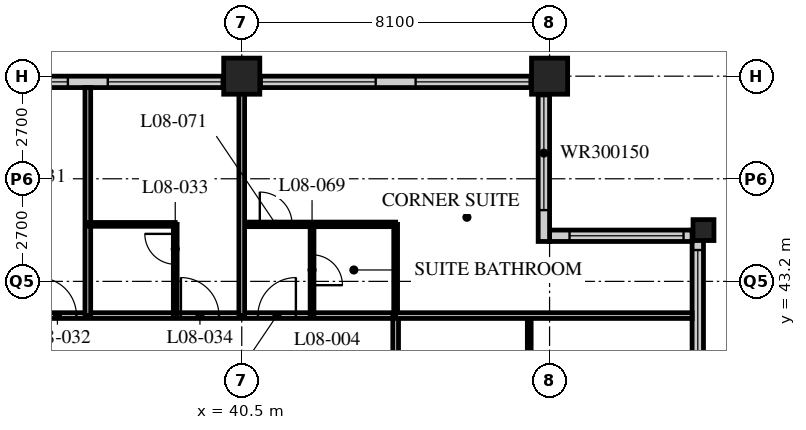
"""IFC4 building model, lengths in metres.
Left out: names, types, materials, properties, quantities, classifications, styles, units other than length and angle.
Written with IfcOpenShell. Run it as: python <this file> out.ifc"""

import sys

from ifc_helpers import new_model, si_unit, direction, frame, frame_2d, origin, origin_2d, place, context, subcontext, project, spatial, rectangle, hollow_rectangle, extrude, element, fill, save


model = new_model("IFC4")
c1 = context("Model", 3, precision=1e-05, world=origin(), true_north=direction((0.0, 1.0)))
c2 = subcontext(c1, "Body", "Model", "MODEL_VIEW")
j1 = project(units=[si_unit("LENGTHUNIT", "METRE"), si_unit("PLANEANGLEUNIT", "RADIAN")], contexts=[c1])
p1 = place(None, origin())
s1 = spatial("IfcSite", under=j1, at=p1, CompositionType="ELEMENT")
p2 = place(p1, origin())
s2 = spatial("IfcBuilding", under=s1, at=p2, CompositionType="ELEMENT")
p3 = place(p2, frame((0.0, 0.0, 39.8)))
s3 = spatial("IfcBuildingStorey", under=s2, at=p3, CompositionType="ELEMENT", Elevation=39.8)
for number, where, z_axis, x_axis in (
    (1, (40.5, 48.6, 0.0), (0.0, 0.0, 1.0), (1.0, 0.0, 0.0)),
    (2, (48.6, 48.6, 0.0), (0.0, 0.0, 1.0), (1.0, 0.0, 0.0)),
):
    element("IfcColumn", number, at=place(p3, frame(where, z_axis=z_axis, x_axis=x_axis)), inside=s3, PredefinedType="COLUMN", context=c2, shape_type="SweptSolid", body=[
        extrude(hollow_rectangle(XDim=0.95, YDim=0.95, WallThickness=0.095, at=origin_2d()), origin(), (0.0, 0.0, 1.0), 3.4),
    ])
p4 = place(p3, frame((52.65, 44.55, 0.0), z_axis=(0.0, 0.0, 1.0), x_axis=(1.0, 0.0, 0.0)))
e3 = element("IfcColumn", 3, at=p4, inside=s3, PredefinedType="COLUMN", context=c2, shape_type="SweptSolid", body=[
    extrude(hollow_rectangle(XDim=0.55, YDim=0.55, WallThickness=0.05, at=origin_2d()), origin(), (0.0, 0.0, 1.0), 3.4),
])
p5 = place(p3, frame((52.5, 40.2, 0.0), z_axis=(0.0, 0.0, 1.0), x_axis=(0.0, 1.0, 0.0)))
e4 = element("IfcWall", 4, at=p5, inside=s3, PredefinedType="SOLIDWALL", context=c2, shape_type="SweptSolid", body=[
    extrude(rectangle(XDim=4.35, YDim=0.3, at=frame_2d((2.175, 0.0))), origin(), (0.0, 0.0, 1.0), 3.19),
])
p6 = place(p5, frame((0.825, 0.0, 0.9)))
e5 = element("IfcOpeningElement", 5, at=p6, cuts=e4, PredefinedType="OPENING", context=c2, shape_type="SweptSolid", body=[
    extrude(rectangle(XDim=3.0, YDim=1.5, at=frame_2d((1.5, 0.75))), frame((0.0, 0.16, 0.0), z_axis=(0.0, -1.0, 0.0), x_axis=(1.0, 0.0, 0.0)), (0.0, 0.0, 1.0), 0.32),
])
p7 = place(p3, frame((52.35, 44.4, 0.0), z_axis=(0.0, 0.0, 1.0), x_axis=(-1.0, 0.0, 0.0)))
e6 = element("IfcWall", 6, at=p7, inside=s3, PredefinedType="SOLIDWALL", context=c2, shape_type="SweptSolid", body=[
    extrude(rectangle(XDim=3.75, YDim=0.3, at=frame_2d((1.875, 0.0))), origin(), (0.0, 0.0, 1.0), 3.19),
])
p8 = place(p7, frame((0.225, 0.0, 0.9)))
e7 = element("IfcOpeningElement", 7, at=p8, cuts=e6, PredefinedType="OPENING", context=c2, shape_type="SweptSolid", body=[
    extrude(rectangle(XDim=3.0, YDim=1.5, at=frame_2d((1.5, 0.75))), frame((0.0, 0.16, 0.0), z_axis=(0.0, -1.0, 0.0), x_axis=(1.0, 0.0, 0.0)), (0.0, 0.0, 1.0), 0.32),
])
p9 = place(p3, frame((48.45, 44.25, 0.0), z_axis=(0.0, 0.0, 1.0), x_axis=(0.0, 1.0, 0.0)))
e8 = element("IfcWall", 8, at=p9, inside=s3, PredefinedType="SOLIDWALL", context=c2, shape_type="SweptSolid", body=[
    extrude(rectangle(XDim=4.35, YDim=0.3, at=frame_2d((2.175, 0.0))), origin(), (0.0, 0.0, 1.0), 3.19),
])
p10 = place(p9, frame((0.825, 0.0, 0.9)))
e9 = element("IfcOpeningElement", 9, at=p10, cuts=e8, PredefinedType="OPENING", context=c2, shape_type="SweptSolid", body=[
    extrude(rectangle(XDim=3.0, YDim=1.5, at=frame_2d((1.5, 0.75))), frame((0.0, 0.16, 0.0), z_axis=(0.0, -1.0, 0.0), x_axis=(1.0, 0.0, 0.0)), (0.0, 0.0, 1.0), 0.32),
])
p11 = place(p3, frame((48.3, 48.45, 0.0), z_axis=(0.0, 0.0, 1.0), x_axis=(-1.0, 0.0, 0.0)))
e10 = element("IfcWall", 10, at=p11, inside=s3, PredefinedType="SOLIDWALL", context=c2, shape_type="SweptSolid", body=[
    extrude(rectangle(XDim=40.2, YDim=0.3, at=frame_2d((20.1, 0.0))), origin(), (0.0, 0.0, 1.0), 3.19),
])
p12 = place(p11, frame((0.225, 0.0, 0.9)))
e11 = element("IfcOpeningElement", 11, at=p12, cuts=e10, PredefinedType="OPENING", context=c2, shape_type="SweptSolid", body=[
    extrude(rectangle(XDim=3.0, YDim=2.0, at=frame_2d((1.5, 1.0))), frame((0.0, 0.16, 0.0), z_axis=(0.0, -1.0, 0.0), x_axis=(1.0, 0.0, 0.0)), (0.0, 0.0, 1.0), 0.32),
])
p13 = place(p11, frame((4.275, 0.0, 0.9)))
e12 = element("IfcOpeningElement", 12, at=p13, cuts=e10, PredefinedType="OPENING", context=c2, shape_type="SweptSolid", body=[
    extrude(rectangle(XDim=3.0, YDim=2.0, at=frame_2d((1.5, 1.0))), frame((0.0, 0.16, 0.0), z_axis=(0.0, -1.0, 0.0), x_axis=(1.0, 0.0, 0.0)), (0.0, 0.0, 1.0), 0.32),
])
p14 = place(p11, frame((8.325, 0.0, 0.9)))
e13 = element("IfcOpeningElement", 13, at=p14, cuts=e10, PredefinedType="OPENING", context=c2, shape_type="SweptSolid", body=[
    extrude(rectangle(XDim=3.0, YDim=2.0, at=frame_2d((1.5, 1.0))), frame((0.0, 0.16, 0.0), z_axis=(0.0, -1.0, 0.0), x_axis=(1.0, 0.0, 0.0)), (0.0, 0.0, 1.0), 0.32),
])
p15 = place(p11, frame((12.375, 0.0, 0.9)))
e14 = element("IfcOpeningElement", 14, at=p15, cuts=e10, PredefinedType="OPENING", context=c2, shape_type="SweptSolid", body=[
    extrude(rectangle(XDim=3.0, YDim=2.0, at=frame_2d((1.5, 1.0))), frame((0.0, 0.16, 0.0), z_axis=(0.0, -1.0, 0.0), x_axis=(1.0, 0.0, 0.0)), (0.0, 0.0, 1.0), 0.32),
])
p16 = place(p11, frame((16.425, 0.0, 0.9)))
e15 = element("IfcOpeningElement", 15, at=p16, cuts=e10, PredefinedType="OPENING", context=c2, shape_type="SweptSolid", body=[
    extrude(rectangle(XDim=3.0, YDim=2.0, at=frame_2d((1.5, 1.0))), frame((0.0, 0.16, 0.0), z_axis=(0.0, -1.0, 0.0), x_axis=(1.0, 0.0, 0.0)), (0.0, 0.0, 1.0), 0.32),
])
p17 = place(p11, frame((20.475, 0.0, 0.9)))
e16 = element("IfcOpeningElement", 16, at=p17, cuts=e10, PredefinedType="OPENING", context=c2, shape_type="SweptSolid", body=[
    extrude(rectangle(XDim=3.0, YDim=2.0, at=frame_2d((1.5, 1.0))), frame((0.0, 0.16, 0.0), z_axis=(0.0, -1.0, 0.0), x_axis=(1.0, 0.0, 0.0)), (0.0, 0.0, 1.0), 0.32),
])
p18 = place(p11, frame((24.525, 0.0, 0.9)))
e17 = element("IfcOpeningElement", 17, at=p18, cuts=e10, PredefinedType="OPENING", context=c2, shape_type="SweptSolid", body=[
    extrude(rectangle(XDim=3.0, YDim=2.0, at=frame_2d((1.5, 1.0))), frame((0.0, 0.16, 0.0), z_axis=(0.0, -1.0, 0.0), x_axis=(1.0, 0.0, 0.0)), (0.0, 0.0, 1.0), 0.32),
])
p19 = place(p11, frame((28.575, 0.0, 0.9)))
e18 = element("IfcOpeningElement", 18, at=p19, cuts=e10, PredefinedType="OPENING", context=c2, shape_type="SweptSolid", body=[
    extrude(rectangle(XDim=3.0, YDim=2.0, at=frame_2d((1.5, 1.0))), frame((0.0, 0.16, 0.0), z_axis=(0.0, -1.0, 0.0), x_axis=(1.0, 0.0, 0.0)), (0.0, 0.0, 1.0), 0.32),
])
p20 = place(p11, frame((32.625, 0.0, 0.9)))
e19 = element("IfcOpeningElement", 19, at=p20, cuts=e10, PredefinedType="OPENING", context=c2, shape_type="SweptSolid", body=[
    extrude(rectangle(XDim=3.0, YDim=2.0, at=frame_2d((1.5, 1.0))), frame((0.0, 0.16, 0.0), z_axis=(0.0, -1.0, 0.0), x_axis=(1.0, 0.0, 0.0)), (0.0, 0.0, 1.0), 0.32),
])
p21 = place(p11, frame((36.675, 0.0, 0.9)))
e20 = element("IfcOpeningElement", 20, at=p21, cuts=e10, PredefinedType="OPENING", context=c2, shape_type="SweptSolid", body=[
    extrude(rectangle(XDim=3.0, YDim=2.0, at=frame_2d((1.5, 1.0))), frame((0.0, 0.16, 0.0), z_axis=(0.0, -1.0, 0.0), x_axis=(1.0, 0.0, 0.0)), (0.0, 0.0, 1.0), 0.32),
])
p22 = place(p3, frame((12.15, 42.3, 0.0), z_axis=(0.0, 0.0, 1.0), x_axis=(1.0, 0.0, 0.0)))
e21 = element("IfcWall", 21, at=p22, inside=s3, PredefinedType="PARTITIONING", context=c2, shape_type="SweptSolid", body=[
    extrude(rectangle(XDim=32.4, YDim=0.15, at=frame_2d((16.2, 0.0))), origin(), (0.0, 0.0, 1.0), 3.19),
])
p23 = place(p22, frame((6.5, 0.0, 0.0)))
e22 = element("IfcOpeningElement", 22, at=p23, cuts=e21, PredefinedType="OPENING", context=c2, shape_type="SweptSolid", body=[
    extrude(rectangle(XDim=1.0, YDim=2.1, at=frame_2d((0.5, 1.05))), frame((0.0, 0.085, 0.0), z_axis=(0.0, -1.0, 0.0), x_axis=(1.0, 0.0, 0.0)), (0.0, 0.0, 1.0), 0.17),
])
p24 = place(p22, frame((8.4, 0.0, 0.0)))
e23 = element("IfcOpeningElement", 23, at=p24, cuts=e21, PredefinedType="OPENING", context=c2, shape_type="SweptSolid", body=[
    extrude(rectangle(XDim=1.0, YDim=2.1, at=frame_2d((0.5, 1.05))), frame((0.0, 0.085, 0.0), z_axis=(0.0, -1.0, 0.0), x_axis=(1.0, 0.0, 0.0)), (0.0, 0.0, 1.0), 0.17),
])
p25 = place(p22, frame((14.6, 0.0, 0.0)))
e24 = element("IfcOpeningElement", 24, at=p25, cuts=e21, PredefinedType="OPENING", context=c2, shape_type="SweptSolid", body=[
    extrude(rectangle(XDim=1.0, YDim=2.1, at=frame_2d((0.5, 1.05))), frame((0.0, 0.085, 0.0), z_axis=(0.0, -1.0, 0.0), x_axis=(1.0, 0.0, 0.0)), (0.0, 0.0, 1.0), 0.17),
])
p26 = place(p22, frame((18.65, 0.0, 0.0)))
e25 = element("IfcOpeningElement", 25, at=p26, cuts=e21, PredefinedType="OPENING", context=c2, shape_type="SweptSolid", body=[
    extrude(rectangle(XDim=1.0, YDim=2.1, at=frame_2d((0.5, 1.05))), frame((0.0, 0.085, 0.0), z_axis=(0.0, -1.0, 0.0), x_axis=(1.0, 0.0, 0.0)), (0.0, 0.0, 1.0), 0.17),
])
p27 = place(p22, frame((23.0, 0.0, 0.0)))
e26 = element("IfcOpeningElement", 26, at=p27, cuts=e21, PredefinedType="OPENING", context=c2, shape_type="SweptSolid", body=[
    extrude(rectangle(XDim=1.0, YDim=2.1, at=frame_2d((0.5, 1.05))), frame((0.0, 0.085, 0.0), z_axis=(0.0, -1.0, 0.0), x_axis=(1.0, 0.0, 0.0)), (0.0, 0.0, 1.0), 0.17),
])
p28 = place(p22, frame((26.75, 0.0, 0.0)))
e27 = element("IfcOpeningElement", 27, at=p28, cuts=e21, PredefinedType="OPENING", context=c2, shape_type="SweptSolid", body=[
    extrude(rectangle(XDim=1.0, YDim=2.1, at=frame_2d((0.5, 1.05))), frame((0.0, 0.085, 0.0), z_axis=(0.0, -1.0, 0.0), x_axis=(1.0, 0.0, 0.0)), (0.0, 0.0, 1.0), 0.17),
])
p29 = place(p22, frame((28.775, 0.0, 0.0)))
e28 = element("IfcOpeningElement", 28, at=p29, cuts=e21, PredefinedType="OPENING", context=c2, shape_type="SweptSolid", body=[
    extrude(rectangle(XDim=1.0, YDim=2.1, at=frame_2d((0.5, 1.05))), frame((0.0, 0.085, 0.0), z_axis=(0.0, -1.0, 0.0), x_axis=(1.0, 0.0, 0.0)), (0.0, 0.0, 1.0), 0.17),
])
p30 = place(p22, frame((2.625, 0.0, 0.0)))
e29 = element("IfcOpeningElement", 29, at=p30, cuts=e21, PredefinedType="OPENING", context=c2, shape_type="SweptSolid", body=[
    extrude(rectangle(XDim=1.0, YDim=2.1, at=frame_2d((0.5, 1.05))), frame((0.0, 0.085, 0.0), z_axis=(0.0, -1.0, 0.0), x_axis=(1.0, 0.0, 0.0)), (0.0, 0.0, 1.0), 0.17),
])
p31 = place(p3, frame((44.55, 16.2, 0.0), z_axis=(0.0, 0.0, 1.0), x_axis=(0.0, 1.0, 0.0)))
e30 = element("IfcWall", 30, at=p31, inside=s3, PredefinedType="PARTITIONING", context=c2, shape_type="SweptSolid", body=[
    extrude(rectangle(XDim=26.1, YDim=0.15, at=frame_2d((13.05, 0.0))), origin(), (0.0, 0.0, 1.0), 3.19),
])
p32 = place(p31, frame((2.75, 0.0, 0.0)))
e31 = element("IfcOpeningElement", 31, at=p32, cuts=e30, PredefinedType="OPENING", context=c2, shape_type="SweptSolid", body=[
    extrude(rectangle(XDim=1.0, YDim=2.1, at=frame_2d((0.5, 1.05))), frame((0.0, 0.085, 0.0), z_axis=(0.0, -1.0, 0.0), x_axis=(1.0, 0.0, 0.0)), (0.0, 0.0, 1.0), 0.17),
])
p33 = place(p31, frame((4.35, 0.0, 0.0)))
e32 = element("IfcOpeningElement", 32, at=p33, cuts=e30, PredefinedType="OPENING", context=c2, shape_type="SweptSolid", body=[
    extrude(rectangle(XDim=1.0, YDim=2.1, at=frame_2d((0.5, 1.05))), frame((0.0, 0.085, 0.0), z_axis=(0.0, -1.0, 0.0), x_axis=(1.0, 0.0, 0.0)), (0.0, 0.0, 1.0), 0.17),
])
p34 = place(p31, frame((8.4, 0.0, 0.0)))
e33 = element("IfcOpeningElement", 33, at=p34, cuts=e30, PredefinedType="OPENING", context=c2, shape_type="SweptSolid", body=[
    extrude(rectangle(XDim=1.0, YDim=2.1, at=frame_2d((0.5, 1.05))), frame((0.0, 0.085, 0.0), z_axis=(0.0, -1.0, 0.0), x_axis=(1.0, 0.0, 0.0)), (0.0, 0.0, 1.0), 0.17),
])
p35 = place(p31, frame((14.6, 0.0, 0.0)))
e34 = element("IfcOpeningElement", 34, at=p35, cuts=e30, PredefinedType="OPENING", context=c2, shape_type="SweptSolid", body=[
    extrude(rectangle(XDim=1.0, YDim=2.1, at=frame_2d((0.5, 1.05))), frame((0.0, 0.085, 0.0), z_axis=(0.0, -1.0, 0.0), x_axis=(1.0, 0.0, 0.0)), (0.0, 0.0, 1.0), 0.17),
])
p36 = place(p31, frame((18.65, 0.0, 0.0)))
e35 = element("IfcOpeningElement", 35, at=p36, cuts=e30, PredefinedType="OPENING", context=c2, shape_type="SweptSolid", body=[
    extrude(rectangle(XDim=1.0, YDim=2.1, at=frame_2d((0.5, 1.05))), frame((0.0, 0.085, 0.0), z_axis=(0.0, -1.0, 0.0), x_axis=(1.0, 0.0, 0.0)), (0.0, 0.0, 1.0), 0.17),
])
p37 = place(p31, frame((22.65, 0.0, 0.0)))
e36 = element("IfcOpeningElement", 36, at=p37, cuts=e30, PredefinedType="OPENING", context=c2, shape_type="SweptSolid", body=[
    extrude(rectangle(XDim=1.0, YDim=2.1, at=frame_2d((0.5, 1.05))), frame((0.0, 0.085, 0.0), z_axis=(0.0, -1.0, 0.0), x_axis=(1.0, 0.0, 0.0)), (0.0, 0.0, 1.0), 0.17),
])
p38 = place(p3, frame((36.45, 42.3, 0.0), z_axis=(0.0, 0.0, 1.0), x_axis=(0.0, 1.0, 0.0)))
e37 = element("IfcWall", 37, at=p38, inside=s3, PredefinedType="PARTITIONING", context=c2, shape_type="SweptSolid", body=[
    extrude(rectangle(XDim=6.0, YDim=0.15, at=frame_2d((3.0, 0.0))), origin(), (0.0, 0.0, 1.0), 3.19),
])
p39 = place(p3, frame((36.45, 44.7, 0.0), z_axis=(0.0, 0.0, 1.0), x_axis=(1.0, 0.0, 0.0)))
e38 = element("IfcWall", 38, at=p39, inside=s3, PredefinedType="PARTITIONING", context=c2, shape_type="SweptSolid", body=[
    extrude(rectangle(XDim=2.3, YDim=0.1, at=frame_2d((1.15, 0.0))), origin(), (0.0, 0.0, 1.0), 3.19),
])
p40 = place(p3, frame((38.75, 42.3, 0.0), z_axis=(0.0, 0.0, 1.0), x_axis=(0.0, 1.0, 0.0)))
e39 = element("IfcWall", 39, at=p40, inside=s3, PredefinedType="PARTITIONING", context=c2, shape_type="SweptSolid", body=[
    extrude(rectangle(XDim=2.4, YDim=0.1, at=frame_2d((1.2, 0.0))), origin(), (0.0, 0.0, 1.0), 3.19),
])
p41 = place(p40, frame((1.35, 0.0, 0.0)))
e40 = element("IfcOpeningElement", 40, at=p41, cuts=e39, PredefinedType="OPENING", context=c2, shape_type="SweptSolid", body=[
    extrude(rectangle(XDim=0.8, YDim=2.1, at=frame_2d((0.4, 1.05))), frame((0.0, 0.06, 0.0), z_axis=(0.0, -1.0, 0.0), x_axis=(1.0, 0.0, 0.0)), (0.0, 0.0, 1.0), 0.12),
])
p42 = place(p3, frame((48.065, 40.0, 0.0), z_axis=(0.0, 0.0, 1.0), x_axis=(0.0, 1.0, 0.0)))
e41 = element("IfcWall", 41, at=p42, inside=s3, PredefinedType="PARTITIONING", context=c2, shape_type="SweptSolid", body=[
    extrude(rectangle(XDim=2.3, YDim=0.1, at=frame_2d((1.15, 0.0))), origin(), (0.0, 0.0, 1.0), 3.19),
])
p43 = place(p3, frame((40.5, 44.7, 0.0), z_axis=(0.0, 0.0, 1.0), x_axis=(1.0, 0.0, 0.0)))
e42 = element("IfcWall", 42, at=p43, inside=s3, PredefinedType="PARTITIONING", context=c2, shape_type="SweptSolid", body=[
    extrude(rectangle(XDim=4.05, YDim=0.12, at=frame_2d((2.025, 0.0))), origin(), (0.0, 0.0, 1.0), 3.19),
])
p44 = place(p43, frame((0.475, 0.0, 0.0)))
e43 = element("IfcOpeningElement", 43, at=p44, cuts=e42, PredefinedType="OPENING", context=c2, shape_type="SweptSolid", body=[
    extrude(rectangle(XDim=0.85, YDim=2.1, at=frame_2d((0.425, 1.05))), frame((0.0, 0.07, 0.0), z_axis=(0.0, -1.0, 0.0), x_axis=(1.0, 0.0, 0.0)), (0.0, 0.0, 1.0), 0.14),
])
p45 = place(p3, frame((42.35, 42.3, 0.0), z_axis=(0.0, 0.0, 1.0), x_axis=(0.0, 1.0, 0.0)))
e44 = element("IfcWall", 44, at=p45, inside=s3, PredefinedType="PARTITIONING", context=c2, shape_type="SweptSolid", body=[
    extrude(rectangle(XDim=2.4, YDim=0.1, at=frame_2d((1.2, 0.0))), origin(), (0.0, 0.0, 1.0), 3.19),
])
p46 = place(p45, frame((0.8, 0.0, 0.0)))
e45 = element("IfcOpeningElement", 45, at=p46, cuts=e44, PredefinedType="OPENING", context=c2, shape_type="SweptSolid", body=[
    extrude(rectangle(XDim=0.8, YDim=2.1, at=frame_2d((0.4, 1.05))), frame((0.0, 0.06, 0.0), z_axis=(0.0, -1.0, 0.0), x_axis=(1.0, 0.0, 0.0)), (0.0, 0.0, 1.0), 0.12),
])
p47 = place(p3, frame((44.55, 42.3, 0.0), z_axis=(0.0, 0.0, 1.0), x_axis=(0.0, 1.0, 0.0)))
e46 = element("IfcWall", 46, at=p47, inside=s3, PredefinedType="PARTITIONING", context=c2, shape_type="SweptSolid", body=[
    extrude(rectangle(XDim=2.4, YDim=0.1, at=frame_2d((1.2, 0.0))), origin(), (0.0, 0.0, 1.0), 3.19),
])
p48 = place(p3, frame((44.55, 42.3, 0.0), z_axis=(0.0, 0.0, 1.0), x_axis=(1.0, 0.0, 0.0)))
e47 = element("IfcWall", 47, at=p48, inside=s3, PredefinedType="PARTITIONING", context=c2, shape_type="SweptSolid", body=[
    extrude(rectangle(XDim=7.8, YDim=0.15, at=frame_2d((3.9, 0.0))), origin(), (0.0, 0.0, 1.0), 3.19),
])
p49 = place(p3, frame((40.5, 42.3, 0.0), z_axis=(0.0, 0.0, 1.0), x_axis=(0.0, 1.0, 0.0)))
e48 = element("IfcWall", 48, at=p49, inside=s3, PredefinedType="PARTITIONING", context=c2, shape_type="SweptSolid", body=[
    extrude(rectangle(XDim=6.0, YDim=0.15, at=frame_2d((3.0, 0.0))), origin(), (0.0, 0.0, 1.0), 2.578),
])
p50 = place(p6, origin())
e49 = element("IfcWindow", 49, at=p50, inside=s3, PartitioningType="SINGLE_PANEL", PredefinedType="WINDOW", context=c2, shape_type="SweptSolid", body=[
    extrude(rectangle(XDim=3.0, YDim=1.5, at=frame_2d((1.5, 0.75))), frame((0.0, 0.03, 0.0), z_axis=(0.0, -1.0, 0.0), x_axis=(1.0, 0.0, 0.0)), (0.0, 0.0, 1.0), 0.06),
])
fill(e5, e49)
p51 = place(p8, origin())
e50 = element("IfcWindow", 50, at=p51, inside=s3, PartitioningType="SINGLE_PANEL", PredefinedType="WINDOW", context=c2, shape_type="SweptSolid", body=[
    extrude(rectangle(XDim=3.0, YDim=1.5, at=frame_2d((1.5, 0.75))), frame((0.0, 0.03, 0.0), z_axis=(0.0, -1.0, 0.0), x_axis=(1.0, 0.0, 0.0)), (0.0, 0.0, 1.0), 0.06),
])
fill(e7, e50)
p52 = place(p10, origin())
e51 = element("IfcWindow", 51, at=p52, inside=s3, PartitioningType="SINGLE_PANEL", PredefinedType="WINDOW", context=c2, shape_type="SweptSolid", body=[
    extrude(rectangle(XDim=3.0, YDim=1.5, at=frame_2d((1.5, 0.75))), frame((0.0, 0.03, 0.0), z_axis=(0.0, -1.0, 0.0), x_axis=(1.0, 0.0, 0.0)), (0.0, 0.0, 1.0), 0.06),
])
fill(e9, e51)
p53 = place(p12, origin())
e52 = element("IfcWindow", 52, at=p53, inside=s3, PartitioningType="SINGLE_PANEL", PredefinedType="WINDOW", context=c2, shape_type="SweptSolid", body=[
    extrude(rectangle(XDim=3.0, YDim=2.0, at=frame_2d((1.5, 1.0))), frame((0.0, 0.03, 0.0), z_axis=(0.0, -1.0, 0.0), x_axis=(1.0, 0.0, 0.0)), (0.0, 0.0, 1.0), 0.06),
])
fill(e11, e52)
p54 = place(p13, origin())
e53 = element("IfcWindow", 53, at=p54, inside=s3, PartitioningType="SINGLE_PANEL", PredefinedType="WINDOW", context=c2, shape_type="SweptSolid", body=[
    extrude(rectangle(XDim=3.0, YDim=2.0, at=frame_2d((1.5, 1.0))), frame((0.0, 0.03, 0.0), z_axis=(0.0, -1.0, 0.0), x_axis=(1.0, 0.0, 0.0)), (0.0, 0.0, 1.0), 0.06),
])
fill(e12, e53)
p55 = place(p14, origin())
e54 = element("IfcWindow", 54, at=p55, inside=s3, PartitioningType="SINGLE_PANEL", PredefinedType="WINDOW", context=c2, shape_type="SweptSolid", body=[
    extrude(rectangle(XDim=3.0, YDim=2.0, at=frame_2d((1.5, 1.0))), frame((0.0, 0.03, 0.0), z_axis=(0.0, -1.0, 0.0), x_axis=(1.0, 0.0, 0.0)), (0.0, 0.0, 1.0), 0.06),
])
fill(e13, e54)
p56 = place(p15, origin())
e55 = element("IfcWindow", 55, at=p56, inside=s3, PartitioningType="SINGLE_PANEL", PredefinedType="WINDOW", context=c2, shape_type="SweptSolid", body=[
    extrude(rectangle(XDim=3.0, YDim=2.0, at=frame_2d((1.5, 1.0))), frame((0.0, 0.03, 0.0), z_axis=(0.0, -1.0, 0.0), x_axis=(1.0, 0.0, 0.0)), (0.0, 0.0, 1.0), 0.06),
])
fill(e14, e55)
p57 = place(p27, origin())
e56 = element("IfcDoor", 56, at=p57, inside=s3, OperationType="SINGLE_SWING_LEFT", PredefinedType="DOOR", context=c2, shape_type="SweptSolid", body=[
    extrude(rectangle(XDim=1.0, YDim=2.1, at=frame_2d((0.5, 1.05))), frame((0.0, 0.025, 0.0), z_axis=(0.0, -1.0, 0.0), x_axis=(1.0, 0.0, 0.0)), (0.0, 0.0, 1.0), 0.05),
])
fill(e26, e56)
p58 = place(p41, origin())
e57 = element("IfcDoor", 57, at=p58, inside=s3, OperationType="SINGLE_SWING_RIGHT", PredefinedType="DOOR", context=c2, shape_type="SweptSolid", body=[
    extrude(rectangle(XDim=0.8, YDim=2.1, at=frame_2d((0.4, 1.05))), frame((0.0, 0.025, 0.0), z_axis=(0.0, -1.0, 0.0), x_axis=(1.0, 0.0, 0.0)), (0.0, 0.0, 1.0), 0.05),
])
fill(e40, e57)
p59 = place(p28, origin())
e58 = element("IfcDoor", 58, at=p59, inside=s3, OperationType="SINGLE_SWING_LEFT", PredefinedType="DOOR", context=c2, shape_type="SweptSolid", body=[
    extrude(rectangle(XDim=1.0, YDim=2.1, at=frame_2d((0.5, 1.05))), frame((0.0, 0.025, 0.0), z_axis=(0.0, -1.0, 0.0), x_axis=(1.0, 0.0, 0.0)), (0.0, 0.0, 1.0), 0.05),
])
fill(e27, e58)
p60 = place(p46, origin())
e59 = element("IfcDoor", 59, at=p60, inside=s3, OperationType="SINGLE_SWING_RIGHT", PredefinedType="DOOR", context=c2, shape_type="SweptSolid", body=[
    extrude(rectangle(XDim=0.8, YDim=2.1, at=frame_2d((0.4, 1.05))), frame((0.0, 0.025, 0.0), z_axis=(0.0, -1.0, 0.0), x_axis=(1.0, 0.0, 0.0)), (0.0, 0.0, 1.0), 0.05),
])
fill(e45, e59)
p61 = place(p29, origin())
e60 = element("IfcDoor", 60, at=p61, inside=s3, OperationType="SINGLE_SWING_RIGHT", PredefinedType="DOOR", context=c2, shape_type="SweptSolid", body=[
    extrude(rectangle(XDim=1.0, YDim=2.1, at=frame_2d((0.5, 1.05))), frame((0.0, 0.025, 0.0), z_axis=(0.0, -1.0, 0.0), x_axis=(1.0, 0.0, 0.0)), (0.0, 0.0, 1.0), 0.05),
])
fill(e28, e60)
p62 = place(p44, origin())
e61 = element("IfcDoor", 61, at=p62, inside=s3, OperationType="SINGLE_SWING_LEFT", PredefinedType="DOOR", context=c2, shape_type="SweptSolid", body=[
    extrude(rectangle(XDim=0.85, YDim=2.1, at=frame_2d((0.425, 1.05))), frame((0.0, 0.025, 0.0), z_axis=(0.0, -1.0, 0.0), x_axis=(1.0, 0.0, 0.0)), (0.0, 0.0, 1.0), 0.05),
])
fill(e43, e61)
save(model, sys.argv[1])
